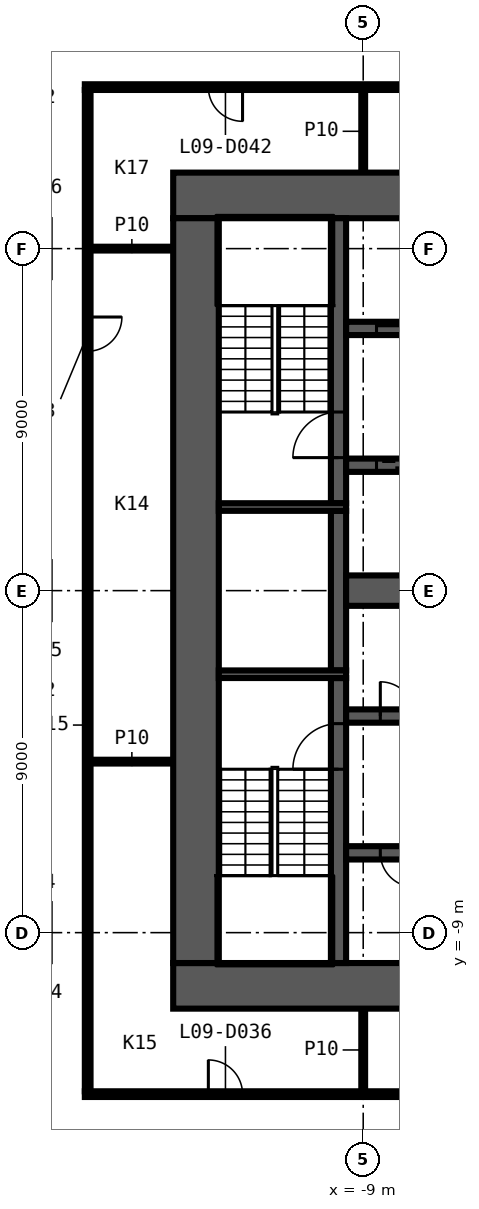
"""IFC4 building model, lengths in metres.
Left out: names, types, materials, properties, quantities, classifications, styles, units other than length and angle.
Written with IfcOpenShell. Run it as: python <this file> out.ifc"""

import sys

from ifc_helpers import new_model, si_unit, direction, frame, frame_2d, origin, place, context, subcontext, project, spatial, rectangle, extrude, element, fill, save


model = new_model("IFC4")
c1 = context("Model", 3, precision=1e-05, world=origin(), true_north=direction((0.0, 1.0)))
c2 = subcontext(c1, "Body", "Model", "MODEL_VIEW")
j1 = project(units=[si_unit("LENGTHUNIT", "METRE"), si_unit("PLANEANGLEUNIT", "RADIAN")], contexts=[c1])
p1 = place(None, origin())
s1 = spatial("IfcSite", under=j1, at=p1, CompositionType="ELEMENT")
p2 = place(p1, origin())
s2 = spatial("IfcBuilding", under=s1, at=p2, CompositionType="ELEMENT")
p3 = place(p2, frame((0.0, 0.0, 55.1)))
s3 = spatial("IfcBuildingStorey", under=s2, at=p3, CompositionType="ELEMENT", Elevation=55.1)
p4 = place(p3, frame((-16.325, -13.25, 0.0), z_axis=(0.0, 0.0, 1.0), x_axis=(1.0, 0.0, 0.0)))
e1 = element("IfcWall", 1, at=p4, inside=s3, PredefinedType="PARTITIONING", context=c2, shape_type="SweptSolid", body=[
    extrude(rectangle(XDim=23.15, YDim=0.15, at=frame_2d((11.575, 0.0))), origin(), (0.0, 0.0, 1.0), 3.3),
])
p5 = place(p4, frame((3.25, 0.0, 0.0)))
e2 = element("IfcOpeningElement", 2, at=p5, cuts=e1, PredefinedType="OPENING", context=c2, shape_type="SweptSolid", body=[
    extrude(rectangle(XDim=0.9, YDim=2.1, at=frame_2d((0.45, 1.05))), frame((0.0, 0.085, 0.0), z_axis=(0.0, -1.0, 0.0), x_axis=(1.0, 0.0, 0.0)), (0.0, 0.0, 1.0), 0.17),
])
p6 = place(p4, frame((9.125, 0.0, 0.0)))
e3 = element("IfcOpeningElement", 3, at=p6, cuts=e1, PredefinedType="OPENING", context=c2, shape_type="SweptSolid", body=[
    extrude(rectangle(XDim=0.9, YDim=2.1, at=frame_2d((0.45, 1.05))), frame((0.0, 0.085, 0.0), z_axis=(0.0, -1.0, 0.0), x_axis=(1.0, 0.0, 0.0)), (0.0, 0.0, 1.0), 0.17),
])
for number, where, z_axis, x_axis in (
    (4, (-16.175, -4.5, 0.0), (0.0, 0.0, 1.0), (1.0, 0.0, 0.0)),
    (5, (-16.175, 9.0, 0.0), (0.0, 0.0, 1.0), (1.0, 0.0, 0.0)),
):
    element("IfcWall", number, at=place(p3, frame(where, z_axis=z_axis, x_axis=x_axis)), inside=s3, PredefinedType="PARTITIONING", context=c2, shape_type="SweptSolid", body=[
        extrude(rectangle(XDim=2.175, YDim=0.1, at=frame_2d((1.087, 0.0))), origin(), (0.0, 0.0, 1.0), 3.3),
    ])
p7 = place(p3, frame((1.425, 13.25, 0.0), z_axis=(0.0, 0.0, 1.0), x_axis=(-1.0, 0.0, 0.0)))
e6 = element("IfcWall", 6, at=p7, inside=s3, PredefinedType="PARTITIONING", context=c2, shape_type="SweptSolid", body=[
    extrude(rectangle(XDim=17.75, YDim=0.15, at=frame_2d((8.875, 0.0))), origin(), (0.0, 0.0, 1.0), 3.3),
])
p8 = place(p7, frame((7.725, 0.0, 0.0)))
e7 = element("IfcOpeningElement", 7, at=p8, cuts=e6, PredefinedType="OPENING", context=c2, shape_type="SweptSolid", body=[
    extrude(rectangle(XDim=0.9, YDim=2.1, at=frame_2d((0.45, 1.05))), frame((0.0, 0.085, 0.0), z_axis=(0.0, -1.0, 0.0), x_axis=(1.0, 0.0, 0.0)), (0.0, 0.0, 1.0), 0.17),
])
p9 = place(p7, frame((13.6, 0.0, 0.0)))
e8 = element("IfcOpeningElement", 8, at=p9, cuts=e6, PredefinedType="OPENING", context=c2, shape_type="SweptSolid", body=[
    extrude(rectangle(XDim=0.9, YDim=2.1, at=frame_2d((0.45, 1.05))), frame((0.0, 0.085, 0.0), z_axis=(0.0, -1.0, 0.0), x_axis=(1.0, 0.0, 0.0)), (0.0, 0.0, 1.0), 0.17),
])
for number, where, z_axis, x_axis in (
    (9, (-9.0, -13.175, 0.0), (0.0, 0.0, 1.0), (0.0, 1.0, 0.0)),
    (10, (-9.0, 11.0, 0.0), (0.0, 0.0, 1.0), (0.0, 1.0, 0.0)),
):
    element("IfcWall", number, at=place(p3, frame(where, z_axis=z_axis, x_axis=x_axis)), inside=s3, PredefinedType="PARTITIONING", context=c2, shape_type="SweptSolid", body=[
        extrude(rectangle(XDim=2.175, YDim=0.1, at=frame_2d((1.087, 0.0))), origin(), (0.0, 0.0, 1.0), 3.3),
    ])
p10 = place(p3, frame((-16.25, 13.175, 0.0), z_axis=(0.0, 0.0, 1.0), x_axis=(0.0, -1.0, 0.0)))
e11 = element("IfcWall", 11, at=p10, inside=s3, PredefinedType="PARTITIONING", context=c2, shape_type="SweptSolid", body=[
    extrude(rectangle(XDim=26.35, YDim=0.15, at=frame_2d((13.175, 0.0))), origin(), (0.0, 0.0, 1.0), 3.3),
])
p11 = place(p10, frame((5.975, 0.0, 0.0)))
e12 = element("IfcOpeningElement", 12, at=p11, cuts=e11, PredefinedType="OPENING", context=c2, shape_type="SweptSolid", body=[
    extrude(rectangle(XDim=0.9, YDim=2.1, at=frame_2d((0.45, 1.05))), frame((0.0, 0.085, 0.0), z_axis=(0.0, -1.0, 0.0), x_axis=(1.0, 0.0, 0.0)), (0.0, 0.0, 1.0), 0.17),
])
p12 = place(p3, frame((-14.0, 10.4, 0.0), z_axis=(0.0, 0.0, 1.0), x_axis=(1.0, 0.0, 0.0)))
e13 = element("IfcWall", 13, at=p12, inside=s3, PredefinedType="SHEAR", context=c2, shape_type="SweptSolid", body=[
    extrude(rectangle(XDim=28.0, YDim=1.2, at=frame_2d((14.0, 0.0))), origin(), (0.0, 0.0, 1.0), 3.3),
])
p13 = place(p12, frame((15.9, 0.0, 0.0)))
e14 = element("IfcOpeningElement", 14, at=p13, cuts=e13, PredefinedType="OPENING", context=c2, shape_type="SweptSolid", body=[
    extrude(rectangle(XDim=1.6, YDim=2.1, at=frame_2d((0.8, 1.05))), frame((0.0, 0.61, 0.0), z_axis=(0.0, -1.0, 0.0), x_axis=(1.0, 0.0, 0.0)), (0.0, 0.0, 1.0), 1.22),
])
p14 = place(p3, frame((14.0, -10.4, 0.0), z_axis=(0.0, 0.0, 1.0), x_axis=(-1.0, 0.0, 0.0)))
e15 = element("IfcWall", 15, at=p14, inside=s3, PredefinedType="SHEAR", context=c2, shape_type="SweptSolid", body=[
    extrude(rectangle(XDim=28.0, YDim=1.2, at=frame_2d((14.0, 0.0))), origin(), (0.0, 0.0, 1.0), 3.3),
])
p15 = place(p14, frame((5.1, 0.0, 0.0)))
e16 = element("IfcOpeningElement", 16, at=p15, cuts=e15, PredefinedType="OPENING", context=c2, shape_type="SweptSolid", body=[
    extrude(rectangle(XDim=1.6, YDim=2.1, at=frame_2d((0.8, 1.05))), frame((0.0, 0.61, 0.0), z_axis=(0.0, -1.0, 0.0), x_axis=(1.0, 0.0, 0.0)), (0.0, 0.0, 1.0), 1.22),
])
p16 = place(p3, frame((-13.4, -9.8, 0.0), z_axis=(0.0, 0.0, 1.0), x_axis=(0.0, 1.0, 0.0)))
e17 = element("IfcWall", 17, at=p16, inside=s3, PredefinedType="SHEAR", context=c2, shape_type="SweptSolid", body=[
    extrude(rectangle(XDim=19.6, YDim=1.2, at=frame_2d((9.8, 0.0))), origin(), (0.0, 0.0, 1.0), 3.3),
])
p17 = place(p3, frame((-9.65, -9.8, 0.0), z_axis=(0.0, 0.0, 1.0), x_axis=(0.0, 1.0, 0.0)))
e18 = element("IfcWall", 18, at=p17, inside=s3, PredefinedType="SHEAR", context=c2, shape_type="SweptSolid", body=[
    extrude(rectangle(XDim=7.5, YDim=0.4, at=frame_2d((3.75, 0.0))), origin(), (0.0, 0.0, 1.0), 3.3),
])
p18 = place(p17, frame((5.1, 0.0, 0.0)))
e19 = element("IfcOpeningElement", 19, at=p18, cuts=e18, PredefinedType="OPENING", context=c2, shape_type="SweptSolid", body=[
    extrude(rectangle(XDim=1.2, YDim=2.1, at=frame_2d((0.6, 1.05))), frame((0.0, 0.21, 0.0), z_axis=(0.0, -1.0, 0.0), x_axis=(1.0, 0.0, 0.0)), (0.0, 0.0, 1.0), 0.42),
])
p19 = place(p3, frame((-9.65, -2.1, 0.0), z_axis=(0.0, 0.0, 1.0), x_axis=(0.0, 1.0, 0.0)))
e20 = element("IfcWall", 20, at=p19, inside=s3, PredefinedType="SHEAR", context=c2, shape_type="SweptSolid", body=[
    extrude(rectangle(XDim=4.2, YDim=0.4, at=frame_2d((2.1, 0.0))), origin(), (0.0, 0.0, 1.0), 3.3),
])
p20 = place(p3, frame((-9.65, 2.3, 0.0), z_axis=(0.0, 0.0, 1.0), x_axis=(0.0, 1.0, 0.0)))
e21 = element("IfcWall", 21, at=p20, inside=s3, PredefinedType="SHEAR", context=c2, shape_type="SweptSolid", body=[
    extrude(rectangle(XDim=7.5, YDim=0.4, at=frame_2d((3.75, 0.0))), origin(), (0.0, 0.0, 1.0), 3.3),
])
p21 = place(p20, frame((1.2, 0.0, 0.0)))
e22 = element("IfcOpeningElement", 22, at=p21, cuts=e21, PredefinedType="OPENING", context=c2, shape_type="SweptSolid", body=[
    extrude(rectangle(XDim=1.2, YDim=2.1, at=frame_2d((0.6, 1.05))), frame((0.0, 0.21, 0.0), z_axis=(0.0, -1.0, 0.0), x_axis=(1.0, 0.0, 0.0)), (0.0, 0.0, 1.0), 0.42),
])
for number, where, z_axis, x_axis in (
    (23, (-9.45, 2.2, 0.0), (0.0, 0.0, 1.0), (-1.0, 0.0, 0.0)),
    (24, (-9.45, -2.2, 0.0), (0.0, 0.0, 1.0), (-1.0, 0.0, 0.0)),
):
    element("IfcWall", number, at=place(p3, frame(where, z_axis=z_axis, x_axis=x_axis)), inside=s3, PredefinedType="SHEAR", context=c2, shape_type="SweptSolid", body=[
        extrude(rectangle(XDim=3.35, YDim=0.2, at=frame_2d((1.675, 0.0))), origin(), (0.0, 0.0, 1.0), 3.3),
    ])
p22 = place(p3, frame((-9.45, 6.9, 0.0), z_axis=(0.0, 0.0, 1.0), x_axis=(1.0, 0.0, 0.0)))
e25 = element("IfcWall", 25, at=p22, inside=s3, PredefinedType="SHEAR", context=c2, shape_type="SweptSolid", body=[
    extrude(rectangle(XDim=18.9, YDim=0.35, at=frame_2d((9.45, 0.0))), origin(), (0.0, 0.0, 1.0), 3.3),
])
p23 = place(p22, frame((0.8, 0.0, 0.0)))
e26 = element("IfcOpeningElement", 26, at=p23, cuts=e25, PredefinedType="OPENING", context=c2, shape_type="SweptSolid", body=[
    extrude(rectangle(XDim=1.1, YDim=2.1, at=frame_2d((0.55, 1.05))), frame((0.0, 0.185, 0.0), z_axis=(0.0, -1.0, 0.0), x_axis=(1.0, 0.0, 0.0)), (0.0, 0.0, 1.0), 0.37),
])
p24 = place(p22, frame((3.5, 0.0, 0.0)))
e27 = element("IfcOpeningElement", 27, at=p24, cuts=e25, PredefinedType="OPENING", context=c2, shape_type="SweptSolid", body=[
    extrude(rectangle(XDim=1.1, YDim=2.1, at=frame_2d((0.55, 1.05))), frame((0.0, 0.185, 0.0), z_axis=(0.0, -1.0, 0.0), x_axis=(1.0, 0.0, 0.0)), (0.0, 0.0, 1.0), 0.37),
])
p25 = place(p22, frame((6.2, 0.0, 0.0)))
e28 = element("IfcOpeningElement", 28, at=p25, cuts=e25, PredefinedType="OPENING", context=c2, shape_type="SweptSolid", body=[
    extrude(rectangle(XDim=1.1, YDim=2.1, at=frame_2d((0.55, 1.05))), frame((0.0, 0.185, 0.0), z_axis=(0.0, -1.0, 0.0), x_axis=(1.0, 0.0, 0.0)), (0.0, 0.0, 1.0), 0.37),
])
p26 = place(p22, frame((8.9, 0.0, 0.0)))
e29 = element("IfcOpeningElement", 29, at=p26, cuts=e25, PredefinedType="OPENING", context=c2, shape_type="SweptSolid", body=[
    extrude(rectangle(XDim=1.1, YDim=2.1, at=frame_2d((0.55, 1.05))), frame((0.0, 0.185, 0.0), z_axis=(0.0, -1.0, 0.0), x_axis=(1.0, 0.0, 0.0)), (0.0, 0.0, 1.0), 0.37),
])
p27 = place(p22, frame((11.55, 0.0, 0.0)))
e30 = element("IfcOpeningElement", 30, at=p27, cuts=e25, PredefinedType="OPENING", context=c2, shape_type="SweptSolid", body=[
    extrude(rectangle(XDim=1.2, YDim=2.1, at=frame_2d((0.6, 1.05))), frame((0.0, 0.185, 0.0), z_axis=(0.0, -1.0, 0.0), x_axis=(1.0, 0.0, 0.0)), (0.0, 0.0, 1.0), 0.37),
])
p28 = place(p22, frame((14.3, 0.0, 0.0)))
e31 = element("IfcOpeningElement", 31, at=p28, cuts=e25, PredefinedType="OPENING", context=c2, shape_type="SweptSolid", body=[
    extrude(rectangle(XDim=1.1, YDim=2.1, at=frame_2d((0.55, 1.05))), frame((0.0, 0.185, 0.0), z_axis=(0.0, -1.0, 0.0), x_axis=(1.0, 0.0, 0.0)), (0.0, 0.0, 1.0), 0.37),
])
p29 = place(p22, frame((17.0, 0.0, 0.0)))
e32 = element("IfcOpeningElement", 32, at=p29, cuts=e25, PredefinedType="OPENING", context=c2, shape_type="SweptSolid", body=[
    extrude(rectangle(XDim=1.1, YDim=2.1, at=frame_2d((0.55, 1.05))), frame((0.0, 0.185, 0.0), z_axis=(0.0, -1.0, 0.0), x_axis=(1.0, 0.0, 0.0)), (0.0, 0.0, 1.0), 0.37),
])
p30 = place(p3, frame((9.45, 3.3, 0.0), z_axis=(0.0, 0.0, 1.0), x_axis=(-1.0, 0.0, 0.0)))
e33 = element("IfcWall", 33, at=p30, inside=s3, PredefinedType="SHEAR", context=c2, shape_type="SweptSolid", body=[
    extrude(rectangle(XDim=18.9, YDim=0.35, at=frame_2d((9.45, 0.0))), origin(), (0.0, 0.0, 1.0), 3.3),
])
p31 = place(p30, frame((17.0, 0.0, 0.0)))
e34 = element("IfcOpeningElement", 34, at=p31, cuts=e33, PredefinedType="OPENING", context=c2, shape_type="SweptSolid", body=[
    extrude(rectangle(XDim=1.1, YDim=2.1, at=frame_2d((0.55, 1.05))), frame((0.0, 0.185, 0.0), z_axis=(0.0, -1.0, 0.0), x_axis=(1.0, 0.0, 0.0)), (0.0, 0.0, 1.0), 0.37),
])
p32 = place(p30, frame((14.3, 0.0, 0.0)))
e35 = element("IfcOpeningElement", 35, at=p32, cuts=e33, PredefinedType="OPENING", context=c2, shape_type="SweptSolid", body=[
    extrude(rectangle(XDim=1.1, YDim=2.1, at=frame_2d((0.55, 1.05))), frame((0.0, 0.185, 0.0), z_axis=(0.0, -1.0, 0.0), x_axis=(1.0, 0.0, 0.0)), (0.0, 0.0, 1.0), 0.37),
])
p33 = place(p30, frame((11.6, 0.0, 0.0)))
e36 = element("IfcOpeningElement", 36, at=p33, cuts=e33, PredefinedType="OPENING", context=c2, shape_type="SweptSolid", body=[
    extrude(rectangle(XDim=1.1, YDim=2.1, at=frame_2d((0.55, 1.05))), frame((0.0, 0.185, 0.0), z_axis=(0.0, -1.0, 0.0), x_axis=(1.0, 0.0, 0.0)), (0.0, 0.0, 1.0), 0.37),
])
p34 = place(p30, frame((8.9, 0.0, 0.0)))
e37 = element("IfcOpeningElement", 37, at=p34, cuts=e33, PredefinedType="OPENING", context=c2, shape_type="SweptSolid", body=[
    extrude(rectangle(XDim=1.1, YDim=2.1, at=frame_2d((0.55, 1.05))), frame((0.0, 0.185, 0.0), z_axis=(0.0, -1.0, 0.0), x_axis=(1.0, 0.0, 0.0)), (0.0, 0.0, 1.0), 0.37),
])
p35 = place(p30, frame((6.2, 0.0, 0.0)))
e38 = element("IfcOpeningElement", 38, at=p35, cuts=e33, PredefinedType="OPENING", context=c2, shape_type="SweptSolid", body=[
    extrude(rectangle(XDim=1.1, YDim=2.1, at=frame_2d((0.55, 1.05))), frame((0.0, 0.185, 0.0), z_axis=(0.0, -1.0, 0.0), x_axis=(1.0, 0.0, 0.0)), (0.0, 0.0, 1.0), 0.37),
])
p36 = place(p30, frame((3.5, 0.0, 0.0)))
e39 = element("IfcOpeningElement", 39, at=p36, cuts=e33, PredefinedType="OPENING", context=c2, shape_type="SweptSolid", body=[
    extrude(rectangle(XDim=1.1, YDim=2.1, at=frame_2d((0.55, 1.05))), frame((0.0, 0.185, 0.0), z_axis=(0.0, -1.0, 0.0), x_axis=(1.0, 0.0, 0.0)), (0.0, 0.0, 1.0), 0.37),
])
p37 = place(p30, frame((0.9, 0.0, 0.0)))
e40 = element("IfcOpeningElement", 40, at=p37, cuts=e33, PredefinedType="OPENING", context=c2, shape_type="SweptSolid", body=[
    extrude(rectangle(XDim=0.9, YDim=2.1, at=frame_2d((0.45, 1.05))), frame((0.0, 0.185, 0.0), z_axis=(0.0, -1.0, 0.0), x_axis=(1.0, 0.0, 0.0)), (0.0, 0.0, 1.0), 0.37),
])
p38 = place(p3, frame((-9.45, -3.3, 0.0), z_axis=(0.0, 0.0, 1.0), x_axis=(1.0, 0.0, 0.0)))
e41 = element("IfcWall", 41, at=p38, inside=s3, PredefinedType="SHEAR", context=c2, shape_type="SweptSolid", body=[
    extrude(rectangle(XDim=18.9, YDim=0.35, at=frame_2d((9.45, 0.0))), origin(), (0.0, 0.0, 1.0), 3.3),
])
p39 = place(p38, frame((17.0, 0.0, 0.0)))
e42 = element("IfcOpeningElement", 42, at=p39, cuts=e41, PredefinedType="OPENING", context=c2, shape_type="SweptSolid", body=[
    extrude(rectangle(XDim=1.1, YDim=2.1, at=frame_2d((0.55, 1.05))), frame((0.0, 0.185, 0.0), z_axis=(0.0, -1.0, 0.0), x_axis=(1.0, 0.0, 0.0)), (0.0, 0.0, 1.0), 0.37),
])
p40 = place(p38, frame((0.9, 0.0, 0.0)))
e43 = element("IfcOpeningElement", 43, at=p40, cuts=e41, PredefinedType="OPENING", context=c2, shape_type="SweptSolid", body=[
    extrude(rectangle(XDim=0.9, YDim=2.1, at=frame_2d((0.45, 1.05))), frame((0.0, 0.185, 0.0), z_axis=(0.0, -1.0, 0.0), x_axis=(1.0, 0.0, 0.0)), (0.0, 0.0, 1.0), 0.37),
])
p41 = place(p38, frame((6.3, 0.0, 0.0)))
e44 = element("IfcOpeningElement", 44, at=p41, cuts=e41, PredefinedType="OPENING", context=c2, shape_type="SweptSolid", body=[
    extrude(rectangle(XDim=0.9, YDim=2.1, at=frame_2d((0.45, 1.05))), frame((0.0, 0.185, 0.0), z_axis=(0.0, -1.0, 0.0), x_axis=(1.0, 0.0, 0.0)), (0.0, 0.0, 1.0), 0.37),
])
p42 = place(p3, frame((9.45, -6.9, 0.0), z_axis=(0.0, 0.0, 1.0), x_axis=(-1.0, 0.0, 0.0)))
e45 = element("IfcWall", 45, at=p42, inside=s3, PredefinedType="SHEAR", context=c2, shape_type="SweptSolid", body=[
    extrude(rectangle(XDim=18.9, YDim=0.35, at=frame_2d((9.45, 0.0))), origin(), (0.0, 0.0, 1.0), 3.3),
])
p43 = place(p42, frame((0.75, 0.0, 0.0)))
e46 = element("IfcOpeningElement", 46, at=p43, cuts=e45, PredefinedType="OPENING", context=c2, shape_type="SweptSolid", body=[
    extrude(rectangle(XDim=1.2, YDim=2.1, at=frame_2d((0.6, 1.05))), frame((0.0, 0.185, 0.0), z_axis=(0.0, -1.0, 0.0), x_axis=(1.0, 0.0, 0.0)), (0.0, 0.0, 1.0), 0.37),
])
p44 = place(p42, frame((17.1, 0.0, 0.0)))
e47 = element("IfcOpeningElement", 47, at=p44, cuts=e45, PredefinedType="OPENING", context=c2, shape_type="SweptSolid", body=[
    extrude(rectangle(XDim=0.9, YDim=2.1, at=frame_2d((0.45, 1.05))), frame((0.0, 0.185, 0.0), z_axis=(0.0, -1.0, 0.0), x_axis=(1.0, 0.0, 0.0)), (0.0, 0.0, 1.0), 0.37),
])
p45 = place(p42, frame((13.05, 0.0, 0.0)))
e48 = element("IfcOpeningElement", 48, at=p45, cuts=e45, PredefinedType="OPENING", context=c2, shape_type="SweptSolid", body=[
    extrude(rectangle(XDim=0.9, YDim=2.1, at=frame_2d((0.45, 1.05))), frame((0.0, 0.185, 0.0), z_axis=(0.0, -1.0, 0.0), x_axis=(1.0, 0.0, 0.0)), (0.0, 0.0, 1.0), 0.37),
])
p46 = place(p42, frame((9.0, 0.0, 0.0)))
e49 = element("IfcOpeningElement", 49, at=p46, cuts=e45, PredefinedType="OPENING", context=c2, shape_type="SweptSolid", body=[
    extrude(rectangle(XDim=0.9, YDim=2.1, at=frame_2d((0.45, 1.05))), frame((0.0, 0.185, 0.0), z_axis=(0.0, -1.0, 0.0), x_axis=(1.0, 0.0, 0.0)), (0.0, 0.0, 1.0), 0.37),
])
p47 = place(p3, frame((-9.45, 0.0, 0.0), z_axis=(0.0, 0.0, 1.0), x_axis=(1.0, 0.0, 0.0)))
e50 = element("IfcWall", 50, at=p47, inside=s3, PredefinedType="SHEAR", context=c2, shape_type="SweptSolid", body=[
    extrude(rectangle(XDim=18.9, YDim=0.8, at=frame_2d((9.45, 0.0))), origin(), (0.0, 0.0, 1.0), 3.3),
])
p48 = place(p5, origin())
e51 = element("IfcDoor", 51, at=p48, inside=s3, OperationType="SINGLE_SWING_LEFT", PredefinedType="DOOR", context=c2, shape_type="SweptSolid", body=[
    extrude(rectangle(XDim=0.9, YDim=2.1, at=frame_2d((0.45, 1.05))), frame((0.0, 0.025, 0.0), z_axis=(0.0, -1.0, 0.0), x_axis=(1.0, 0.0, 0.0)), (0.0, 0.0, 1.0), 0.05),
])
fill(e2, e51)
p49 = place(p9, origin())
e52 = element("IfcDoor", 52, at=p49, inside=s3, OperationType="SINGLE_SWING_LEFT", PredefinedType="DOOR", context=c2, shape_type="SweptSolid", body=[
    extrude(rectangle(XDim=0.9, YDim=2.1, at=frame_2d((0.45, 1.05))), frame((0.0, 0.025, 0.0), z_axis=(0.0, -1.0, 0.0), x_axis=(1.0, 0.0, 0.0)), (0.0, 0.0, 1.0), 0.05),
])
fill(e8, e52)
p50 = place(p11, origin())
e53 = element("IfcDoor", 53, at=p50, inside=s3, OperationType="SINGLE_SWING_RIGHT", PredefinedType="DOOR", context=c2, shape_type="SweptSolid", body=[
    extrude(rectangle(XDim=0.9, YDim=2.1, at=frame_2d((0.45, 1.05))), frame((0.0, 0.025, 0.0), z_axis=(0.0, -1.0, 0.0), x_axis=(1.0, 0.0, 0.0)), (0.0, 0.0, 1.0), 0.05),
])
fill(e12, e53)
p51 = place(p23, origin())
e54 = element("IfcDoor", 54, at=p51, inside=s3, OperationType="DOUBLE_DOOR_SLIDING", PredefinedType="DOOR", context=c2, shape_type="SweptSolid", body=[
    extrude(rectangle(XDim=1.1, YDim=2.1, at=frame_2d((0.55, 1.05))), frame((0.0, 0.025, 0.0), z_axis=(0.0, -1.0, 0.0), x_axis=(1.0, 0.0, 0.0)), (0.0, 0.0, 1.0), 0.05),
])
fill(e26, e54)
p52 = place(p31, origin())
e55 = element("IfcDoor", 55, at=p52, inside=s3, OperationType="DOUBLE_DOOR_SLIDING", PredefinedType="DOOR", context=c2, shape_type="SweptSolid", body=[
    extrude(rectangle(XDim=1.1, YDim=2.1, at=frame_2d((0.55, 1.05))), frame((0.0, 0.025, 0.0), z_axis=(0.0, -1.0, 0.0), x_axis=(1.0, 0.0, 0.0)), (0.0, 0.0, 1.0), 0.05),
])
fill(e34, e55)
p53 = place(p40, origin())
e56 = element("IfcDoor", 56, at=p53, inside=s3, OperationType="SINGLE_SWING_RIGHT", PredefinedType="DOOR", context=c2, shape_type="SweptSolid", body=[
    extrude(rectangle(XDim=0.9, YDim=2.1, at=frame_2d((0.45, 1.05))), frame((0.0, 0.025, 0.0), z_axis=(0.0, -1.0, 0.0), x_axis=(1.0, 0.0, 0.0)), (0.0, 0.0, 1.0), 0.05),
])
fill(e43, e56)
p54 = place(p44, origin())
e57 = element("IfcDoor", 57, at=p54, inside=s3, OperationType="SINGLE_SWING_RIGHT", PredefinedType="DOOR", context=c2, shape_type="SweptSolid", body=[
    extrude(rectangle(XDim=0.9, YDim=2.1, at=frame_2d((0.45, 1.05))), frame((0.0, 0.025, 0.0), z_axis=(0.0, -1.0, 0.0), x_axis=(1.0, 0.0, 0.0)), (0.0, 0.0, 1.0), 0.05),
])
fill(e47, e57)
p55 = place(p21, origin())
e58 = element("IfcDoor", 58, at=p55, inside=s3, OperationType="SINGLE_SWING_RIGHT", PredefinedType="DOOR", context=c2, shape_type="SweptSolid", body=[
    extrude(rectangle(XDim=1.2, YDim=2.1, at=frame_2d((0.6, 1.05))), frame((0.0, 0.025, 0.0), z_axis=(0.0, -1.0, 0.0), x_axis=(1.0, 0.0, 0.0)), (0.0, 0.0, 1.0), 0.05),
])
fill(e22, e58)
p56 = place(p18, origin())
e59 = element("IfcDoor", 59, at=p56, inside=s3, OperationType="SINGLE_SWING_LEFT", PredefinedType="DOOR", context=c2, shape_type="SweptSolid", body=[
    extrude(rectangle(XDim=1.2, YDim=2.1, at=frame_2d((0.6, 1.05))), frame((0.0, 0.025, 0.0), z_axis=(0.0, -1.0, 0.0), x_axis=(1.0, 0.0, 0.0)), (0.0, 0.0, 1.0), 0.05),
])
fill(e19, e59)
save(model, sys.argv[1])
